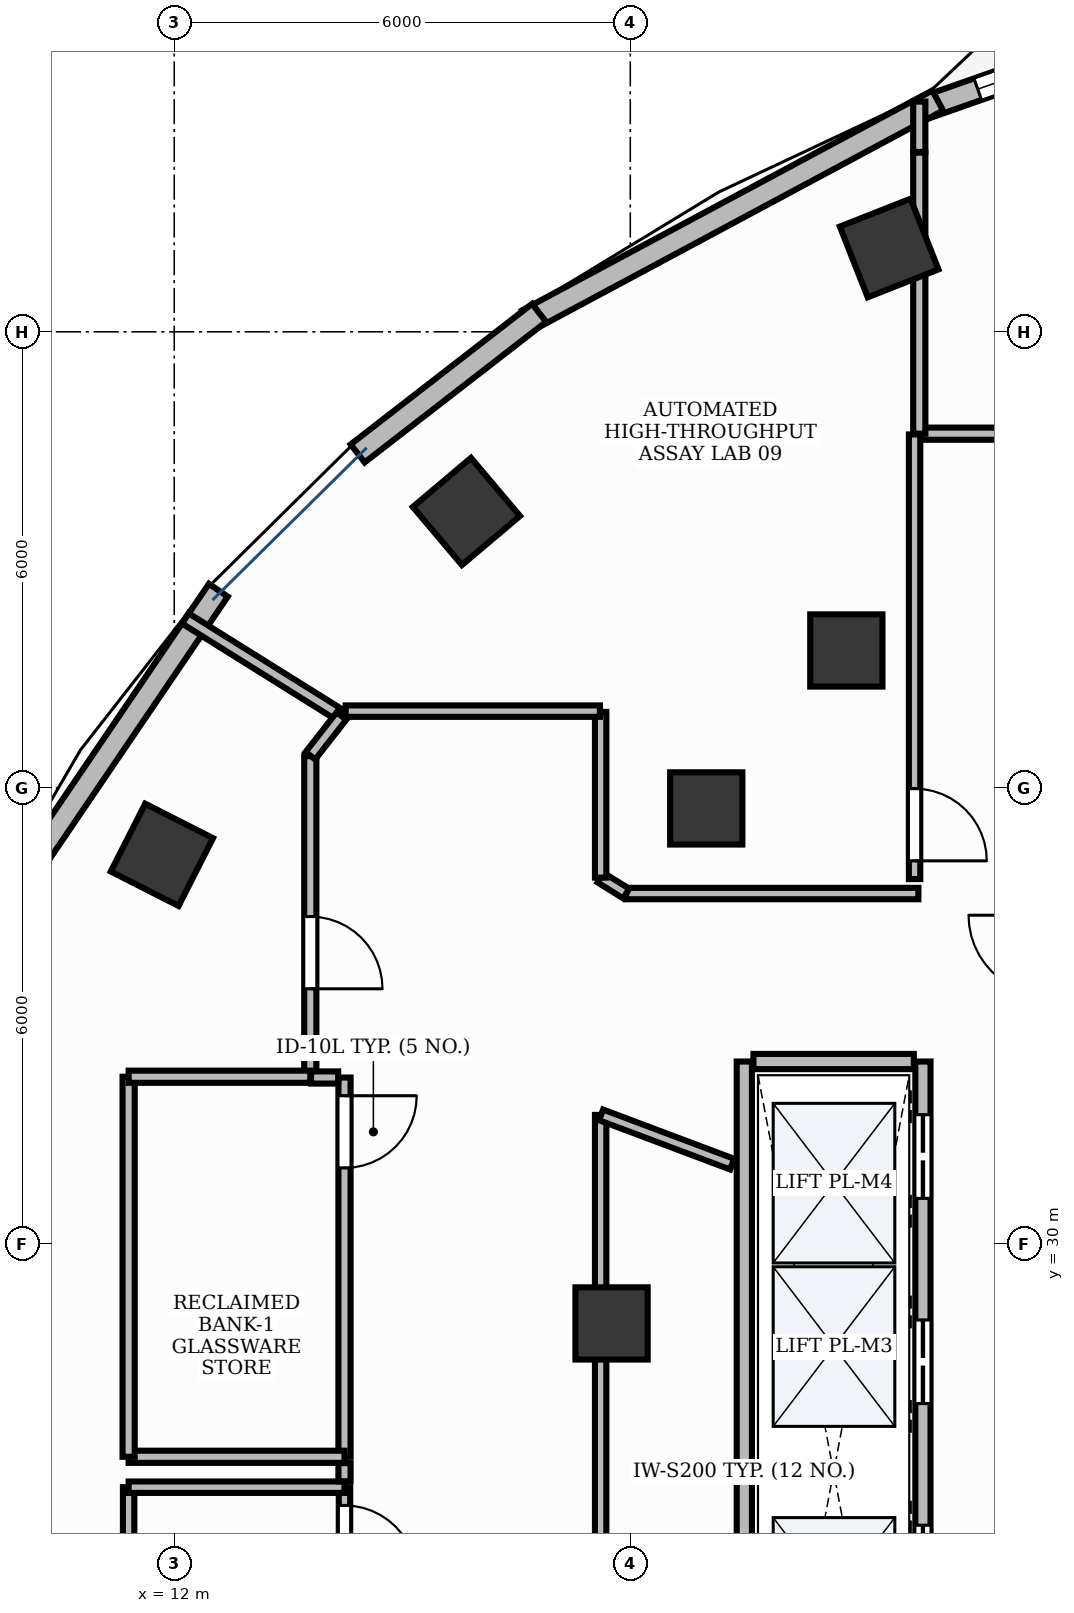
"""IFC4 building model, lengths in metres.
Left out: names, types, materials, properties, quantities, classifications, styles, units other than length and angle.
Written with IfcOpenShell. Run it as: python <this file> out.ifc"""

import sys

from ifc_helpers import new_model, si_unit, direction, frame, frame_2d, origin, origin_2d, place, context, subcontext, project, spatial, rectangle, extrude, element, fill, save


model = new_model("IFC4")
c1 = context("Model", 3, precision=1e-05, world=origin(), true_north=direction((0.0, 1.0)))
c2 = subcontext(c1, "Body", "Model", "MODEL_VIEW")
j1 = project(units=[si_unit("LENGTHUNIT", "METRE"), si_unit("PLANEANGLEUNIT", "RADIAN")], contexts=[c1])
p1 = place(None, origin())
s1 = spatial("IfcSite", under=j1, at=p1, CompositionType="ELEMENT")
p2 = place(p1, origin())
s2 = spatial("IfcBuilding", under=s1, at=p2, CompositionType="ELEMENT")
p3 = place(p2, frame((0.0, 0.0, 187.8)))
s3 = spatial("IfcBuildingStorey", under=s2, at=p3, CompositionType="ELEMENT", Elevation=187.8)
for number, where, z_axis, x_axis in (
    (1, (21.406, 43.103, -0.0), (0.0, 0.0, 1.0), (0.93, 0.367, 0.0)),
    (2, (15.844, 39.637, -0.0), (0.0, 0.0, 1.0), (0.764, 0.645, 0.0)),
):
    element("IfcColumn", number, at=place(p3, frame(where, z_axis=z_axis, x_axis=x_axis)), inside=s3, PredefinedType="COLUMN", context=c2, shape_type="SweptSolid", body=[
        extrude(rectangle(XDim=1.0, YDim=1.0, at=origin_2d()), origin(), (0.0, 0.0, 1.0), 3.901),
    ])
p4 = place(p3, frame((20.842, 37.808, -0.0), z_axis=(0.0, 0.0, 1.0), x_axis=(1.0, 0.0, 0.0)))
e3 = element("IfcColumn", 3, at=p4, inside=s3, PredefinedType="COLUMN", context=c2, shape_type="SweptSolid", body=[
    extrude(rectangle(XDim=0.95, YDim=0.95, at=origin_2d()), origin(), (0.0, 0.0, 1.0), 3.901),
])
p5 = place(p3, frame((11.838, 35.119, -0.0), z_axis=(0.0, 0.0, 1.0), x_axis=(0.453057191132, 0.891481453292, 0.0)))
e4 = element("IfcColumn", 4, at=p5, inside=s3, PredefinedType="COLUMN", context=c2, shape_type="SweptSolid", body=[
    extrude(rectangle(XDim=1.0, YDim=1.0, at=origin_2d()), origin(), (0.0, 0.0, 1.0), 3.901),
])
for number, where, z_axis, x_axis in (
    (5, (19.0, 35.73, -0.0), (0.0, 0.0, 1.0), (1.0, 0.0, 0.0)),
    (6, (17.753, 28.955, -0.0), (0.0, 0.0, 1.0), (1.0, 0.0, 0.0)),
):
    element("IfcColumn", number, at=place(p3, frame(where, z_axis=z_axis, x_axis=x_axis)), inside=s3, PredefinedType="COLUMN", context=c2, shape_type="SweptSolid", body=[
        extrude(rectangle(XDim=0.95, YDim=0.95, at=origin_2d()), origin(), (0.0, 0.0, 1.0), 3.901),
    ])
p6 = place(p3, frame((24.937, 46.023, 0.0), z_axis=(0.0, 0.0, 1.0), x_axis=(-0.943495444321, -0.331385495377, 0.0)))
e7 = element("IfcWall", 7, at=p6, inside=s3, PredefinedType="STANDARD", context=c2, shape_type="SweptSolid", body=[
    extrude(rectangle(XDim=3.214, YDim=0.3, at=frame_2d((1.607, 0.0))), origin(), (0.0, 0.0, 1.0), 3.9),
])
p7 = place(p6, frame((0.707, 0.0, 0.9)))
e8 = element("IfcOpeningElement", 8, at=p7, cuts=e7, PredefinedType="OPENING", context=c2, shape_type="SweptSolid", body=[
    extrude(rectangle(XDim=1.8, YDim=2.1, at=frame_2d((0.9, 1.05))), frame((0.0, 0.165, 0.0), z_axis=(0.0, -1.0, 0.0), x_axis=(1.0, 0.0, 0.0)), (0.0, 0.0, 1.0), 0.33),
])
p8 = place(p3, frame((22.044, 45.043, 0.0), z_axis=(0.0, 0.0, 1.0), x_axis=(-0.881364369565, -0.472437136624, 0.0)))
e9 = element("IfcWall", 9, at=p8, inside=s3, PredefinedType="STANDARD", context=c2, shape_type="SweptSolid", body=[
    extrude(rectangle(XDim=6.124, YDim=0.3, at=frame_2d((3.062, 0.0))), origin(), (0.0, 0.0, 1.0), 3.47),
])
p9 = place(p3, frame((16.8, 42.25, 0.0), z_axis=(0.0, 0.0, 1.0), x_axis=(-0.790530517055, -0.612422649488, 0.0)))
e10 = element("IfcWall", 10, at=p9, inside=s3, PredefinedType="STANDARD", context=c2, shape_type="SweptSolid", body=[
    extrude(rectangle(XDim=3.02, YDim=0.3, at=frame_2d((1.51, 0.0))), origin(), (0.0, 0.0, 1.0), 3.47),
])
p10 = place(p3, frame((12.58, 38.601, 0.0), z_axis=(0.0, 0.0, 1.0), x_axis=(-0.561663900064, -0.827365495634, 0.0)))
e11 = element("IfcWall", 11, at=p10, inside=s3, PredefinedType="STANDARD", context=c2, shape_type="SweptSolid", body=[
    extrude(rectangle(XDim=5.438, YDim=0.3, at=frame_2d((2.719, 0.0))), origin(), (0.0, 0.0, 1.0), 3.9),
])
p11 = place(p3, frame((19.5, 21.6, 0.0), z_axis=(0.0, 0.0, 1.0), x_axis=(0.0, 1.0, 0.0)))
e12 = element("IfcWall", 12, at=p11, inside=s3, PredefinedType="PARTITIONING", context=c2, shape_type="SweptSolid", body=[
    extrude(rectangle(XDim=10.8, YDim=0.2, at=frame_2d((5.4, 0.0))), origin(), (0.0, 0.0, 1.0), 2.91),
])
p12 = place(p3, frame((21.85, 21.6, 0.0), z_axis=(0.0, 0.0, 1.0), x_axis=(0.0, 1.0, 0.0)))
e13 = element("IfcWall", 13, at=p12, inside=s3, PredefinedType="PARTITIONING", context=c2, shape_type="SweptSolid", body=[
    extrude(rectangle(XDim=10.8, YDim=0.2, at=frame_2d((5.4, 0.0))), origin(), (0.0, 0.0, 1.0), 2.91),
])
p13 = place(p12, frame((0.9, 0.0, 0.0)))
e14 = element("IfcOpeningElement", 14, at=p13, cuts=e13, PredefinedType="OPENING", context=c2, shape_type="SweptSolid", body=[
    extrude(rectangle(XDim=1.1, YDim=2.2, at=frame_2d((0.55, 1.1))), frame((0.0, 0.115, 0.0), z_axis=(0.0, -1.0, 0.0), x_axis=(1.0, 0.0, 0.0)), (0.0, 0.0, 1.0), 0.23),
])
p14 = place(p12, frame((3.6, 0.0, 0.0)))
e15 = element("IfcOpeningElement", 15, at=p14, cuts=e13, PredefinedType="OPENING", context=c2, shape_type="SweptSolid", body=[
    extrude(rectangle(XDim=1.1, YDim=2.2, at=frame_2d((0.55, 1.1))), frame((0.0, 0.115, 0.0), z_axis=(0.0, -1.0, 0.0), x_axis=(1.0, 0.0, 0.0)), (0.0, 0.0, 1.0), 0.23),
])
p15 = place(p12, frame((6.3, 0.0, 0.0)))
e16 = element("IfcOpeningElement", 16, at=p15, cuts=e13, PredefinedType="OPENING", context=c2, shape_type="SweptSolid", body=[
    extrude(rectangle(XDim=1.1, YDim=2.2, at=frame_2d((0.55, 1.1))), frame((0.0, 0.115, 0.0), z_axis=(0.0, -1.0, 0.0), x_axis=(1.0, 0.0, 0.0)), (0.0, 0.0, 1.0), 0.23),
])
p16 = place(p12, frame((9.0, 0.0, 0.0)))
e17 = element("IfcOpeningElement", 17, at=p16, cuts=e13, PredefinedType="OPENING", context=c2, shape_type="SweptSolid", body=[
    extrude(rectangle(XDim=1.1, YDim=2.2, at=frame_2d((0.55, 1.1))), frame((0.0, 0.115, 0.0), z_axis=(0.0, -1.0, 0.0), x_axis=(1.0, 0.0, 0.0)), (0.0, 0.0, 1.0), 0.23),
])
p17 = place(p3, frame((19.62, 32.4, 0.0), z_axis=(0.0, 0.0, 1.0), x_axis=(1.0, 0.0, 0.0)))
e18 = element("IfcWall", 18, at=p17, inside=s3, PredefinedType="PARTITIONING", context=c2, shape_type="SweptSolid", body=[
    extrude(rectangle(XDim=2.11, YDim=0.2, at=frame_2d((1.055, 0.0))), origin(), (0.0, 0.0, 1.0), 2.91),
])
p18 = place(p3, frame((14.24, 26.8, 0.0), z_axis=(0.0, 0.0, 1.0), x_axis=(0.0, -1.0, 0.0)))
e19 = element("IfcWall", 19, at=p18, inside=s3, PredefinedType="PARTITIONING", context=c2, shape_type="SweptSolid", body=[
    extrude(rectangle(XDim=4.99, YDim=0.15, at=frame_2d((2.495, 0.0))), origin(), (0.0, 0.0, 1.0), 2.91),
])
p19 = place(p18, frame((0.24, 0.0, 0.0)))
e20 = element("IfcOpeningElement", 20, at=p19, cuts=e19, PredefinedType="OPENING", context=c2, shape_type="SweptSolid", body=[
    extrude(rectangle(XDim=0.95, YDim=2.15, at=frame_2d((0.475, 1.075))), frame((0.0, 0.09, 0.0), z_axis=(0.0, -1.0, 0.0), x_axis=(1.0, 0.0, 0.0)), (0.0, 0.0, 1.0), 0.18),
])
p20 = place(p3, frame((14.24, 32.19, 0.0), z_axis=(0.0, 0.0, 1.0), x_axis=(0.0, -1.0, 0.0)))
e21 = element("IfcWall", 21, at=p20, inside=s3, PredefinedType="PARTITIONING", context=c2, shape_type="SweptSolid", body=[
    extrude(rectangle(XDim=4.99, YDim=0.16, at=frame_2d((2.495, 0.0))), origin(), (0.0, 0.0, 1.0), 2.91),
])
p21 = place(p20, frame((0.24, 0.0, 0.0)))
e22 = element("IfcOpeningElement", 22, at=p21, cuts=e21, PredefinedType="OPENING", context=c2, shape_type="SweptSolid", body=[
    extrude(rectangle(XDim=0.95, YDim=2.15, at=frame_2d((0.475, 1.075))), frame((0.0, 0.095, 0.0), z_axis=(0.0, -1.0, 0.0), x_axis=(1.0, 0.0, 0.0)), (0.0, 0.0, 1.0), 0.19),
])
p22 = place(p3, frame((13.79, 36.417, 0.0), z_axis=(0.0, 0.0, 1.0), x_axis=(0.0, -1.0, 0.0)))
e23 = element("IfcWall", 23, at=p22, inside=s3, PredefinedType="PARTITIONING", context=c2, shape_type="SweptSolid", body=[
    extrude(rectangle(XDim=4.208, YDim=0.16, at=frame_2d((2.104, 0.0))), origin(), (0.0, 0.0, 1.0), 2.91),
])
p23 = place(p22, frame((2.111, 0.0, 0.0)))
e24 = element("IfcOpeningElement", 24, at=p23, cuts=e23, PredefinedType="OPENING", context=c2, shape_type="SweptSolid", body=[
    extrude(rectangle(XDim=0.95, YDim=2.15, at=frame_2d((0.475, 1.075))), frame((0.0, 0.095, 0.0), z_axis=(0.0, -1.0, 0.0), x_axis=(1.0, 0.0, 0.0)), (0.0, 0.0, 1.0), 0.19),
])
p24 = place(p3, frame((17.61, 20.602, 0.0), z_axis=(0.0, 0.0, 1.0), x_axis=(0.0, 1.0, 0.0)))
e25 = element("IfcWall", 25, at=p24, inside=s3, PredefinedType="PARTITIONING", context=c2, shape_type="SweptSolid", body=[
    extrude(rectangle(XDim=11.096, YDim=0.15, at=frame_2d((5.548, 0.0))), origin(), (0.0, 0.0, 1.0), 2.91),
])
p25 = place(p24, frame((3.03, 0.0, 0.0)))
e26 = element("IfcOpeningElement", 26, at=p25, cuts=e25, PredefinedType="OPENING", context=c2, shape_type="SweptSolid", body=[
    extrude(rectangle(XDim=0.95, YDim=2.15, at=frame_2d((0.475, 1.075))), frame((0.0, 0.09, 0.0), z_axis=(0.0, -1.0, 0.0), x_axis=(1.0, 0.0, 0.0)), (0.0, 0.0, 1.0), 0.18),
])
p26 = place(p3, frame((30.232, 40.66, 0.0), z_axis=(0.0, 0.0, 1.0), x_axis=(-1.0, 0.0, 0.0)))
e27 = element("IfcWall", 27, at=p26, inside=s3, PredefinedType="PARTITIONING", context=c2, shape_type="SweptSolid", body=[
    extrude(rectangle(XDim=8.43, YDim=0.16, at=frame_2d((4.215, 0.0))), origin(), (0.0, 0.0, 1.0), 2.91),
])
p27 = place(p26, frame((0.24, 0.0, 0.0)))
e28 = element("IfcOpeningElement", 28, at=p27, cuts=e27, PredefinedType="OPENING", context=c2, shape_type="SweptSolid", body=[
    extrude(rectangle(XDim=0.95, YDim=2.15, at=frame_2d((0.475, 1.075))), frame((0.0, 0.095, 0.0), z_axis=(0.0, -1.0, 0.0), x_axis=(1.0, 0.0, 0.0)), (0.0, 0.0, 1.0), 0.19),
])
p28 = place(p3, frame((21.74, 40.65, 0.0), z_axis=(0.0, 0.0, 1.0), x_axis=(0.0, -1.0, 0.0)))
e29 = element("IfcWall", 29, at=p28, inside=s3, PredefinedType="PARTITIONING", context=c2, shape_type="SweptSolid", body=[
    extrude(rectangle(XDim=5.85, YDim=0.15, at=frame_2d((2.925, 0.0))), origin(), (0.0, 0.0, 1.0), 2.91),
])
p29 = place(p28, frame((4.66, 0.0, 0.0)))
e30 = element("IfcOpeningElement", 30, at=p29, cuts=e29, PredefinedType="OPENING", context=c2, shape_type="SweptSolid", body=[
    extrude(rectangle(XDim=0.95, YDim=2.15, at=frame_2d((0.475, 1.075))), frame((0.0, 0.09, 0.0), z_axis=(0.0, -1.0, 0.0), x_axis=(1.0, 0.0, 0.0)), (0.0, 0.0, 1.0), 0.18),
])
p30 = place(p3, frame((11.4, 21.8, 0.0), z_axis=(0.0, 0.0, 1.0), x_axis=(0.0, 1.0, 0.0)))
e31 = element("IfcWall", 31, at=p30, inside=s3, PredefinedType="PARTITIONING", context=c2, shape_type="SweptSolid", body=[
    extrude(rectangle(XDim=5.0, YDim=0.15, at=frame_2d((2.5, 0.0))), origin(), (0.0, 0.0, 1.0), 2.91),
])
p31 = place(p3, frame((11.4, 26.8, 0.0), z_axis=(0.0, 0.0, 1.0), x_axis=(1.0, 0.0, 0.0)))
e32 = element("IfcWall", 32, at=p31, inside=s3, PredefinedType="PARTITIONING", context=c2, shape_type="SweptSolid", body=[
    extrude(rectangle(XDim=2.84, YDim=0.15, at=frame_2d((1.42, 0.0))), origin(), (0.0, 0.0, 1.0), 2.91),
])
p32 = place(p3, frame((13.8, 32.19, 0.0), z_axis=(0.0, 0.0, 1.0), x_axis=(1.0, 0.0, 0.0)))
e33 = element("IfcWall", 33, at=p32, inside=s3, PredefinedType="PARTITIONING", context=c2, shape_type="SweptSolid", body=[
    extrude(rectangle(XDim=0.357, YDim=0.16, at=frame_2d((0.178, 0.0))), origin(), (0.0, 0.0, 1.0), 2.91),
])
p33 = place(p3, frame((14.24, 27.2, 0.0), z_axis=(0.0, 0.0, 1.0), x_axis=(-1.0, 0.0, 0.0)))
e34 = element("IfcWall", 34, at=p33, inside=s3, PredefinedType="PARTITIONING", context=c2, shape_type="SweptSolid", body=[
    extrude(rectangle(XDim=2.84, YDim=0.16, at=frame_2d((1.42, 0.0))), origin(), (0.0, 0.0, 1.0), 2.91),
])
p34 = place(p3, frame((11.4, 27.2, 0.0), z_axis=(0.0, 0.0, 1.0), x_axis=(0.0, 1.0, 0.0)))
e35 = element("IfcWall", 35, at=p34, inside=s3, PredefinedType="PARTITIONING", context=c2, shape_type="SweptSolid", body=[
    extrude(rectangle(XDim=5.0, YDim=0.16, at=frame_2d((2.5, 0.0))), origin(), (0.0, 0.0, 1.0), 2.91),
])
p35 = place(p3, frame((11.4, 32.2, 0.0), z_axis=(0.0, 0.0, 1.0), x_axis=(1.0, 0.0, 0.0)))
e36 = element("IfcWall", 36, at=p35, inside=s3, PredefinedType="PARTITIONING", context=c2, shape_type="SweptSolid", body=[
    extrude(rectangle(XDim=2.39, YDim=0.16, at=frame_2d((1.195, 0.0))), origin(), (0.0, 0.0, 1.0), 2.91),
])
p36 = place(p3, frame((12.146, 38.229, 0.0), z_axis=(0.0, 0.0, 1.0), x_axis=(0.848066263041, -0.529890190031, 0.0)))
e37 = element("IfcWall", 37, at=p36, inside=s3, PredefinedType="PARTITIONING", context=c2, shape_type="SweptSolid", body=[
    extrude(rectangle(XDim=2.422, YDim=0.16, at=frame_2d((1.211, 0.0))), origin(), (0.0, 0.0, 1.0), 2.91),
])
p37 = place(p3, frame((14.2, 36.946, 0.0), z_axis=(0.0, 0.0, 1.0), x_axis=(-0.615851305214, -0.787862405415, 0.0)))
e38 = element("IfcWall", 38, at=p37, inside=s3, PredefinedType="PARTITIONING", context=c2, shape_type="SweptSolid", body=[
    extrude(rectangle(XDim=0.663, YDim=0.16, at=frame_2d((0.332, 0.0))), origin(), (0.0, 0.0, 1.0), 2.91),
])
p38 = place(p3, frame((14.24, 27.117, 0.0), z_axis=(0.0, 0.0, 1.0), x_axis=(0.0, -1.0, 0.0)))
e39 = element("IfcWall", 39, at=p38, inside=s3, PredefinedType="PARTITIONING", context=c2, shape_type="SweptSolid", body=[
    extrude(rectangle(XDim=0.239, YDim=0.16, at=frame_2d((0.12, 0.0))), origin(), (0.0, 0.0, 1.0), 2.91),
])
p39 = place(p3, frame((17.616, 31.698, 0.0), z_axis=(0.0, 0.0, 1.0), x_axis=(0.936061955156, -0.351835211583, 0.0)))
e40 = element("IfcWall", 40, at=p39, inside=s3, PredefinedType="PARTITIONING", context=c2, shape_type="SweptSolid", body=[
    extrude(rectangle(XDim=1.842, YDim=0.15, at=frame_2d((0.921, 0.0))), origin(), (0.0, 0.0, 1.0), 2.91),
])
p40 = place(p3, frame((21.802, 44.367, 0.0), z_axis=(0.0, 0.0, 1.0), x_axis=(0.0, 1.0, 0.0)))
e41 = element("IfcWall", 41, at=p40, inside=s3, PredefinedType="PARTITIONING", context=c2, shape_type="SweptSolid", body=[
    extrude(rectangle(XDim=0.662, YDim=0.16, at=frame_2d((0.331, 0.0))), origin(), (0.0, 0.0, 1.0), 2.91),
])
p41 = place(p3, frame((21.802, 40.66, 0.0), z_axis=(0.0, 0.0, 1.0), x_axis=(0.0, 1.0, 0.0)))
e42 = element("IfcWall", 42, at=p41, inside=s3, PredefinedType="PARTITIONING", context=c2, shape_type="SweptSolid", body=[
    extrude(rectangle(XDim=3.697, YDim=0.16, at=frame_2d((1.849, 0.0))), origin(), (0.0, 0.0, 1.0), 2.91),
])
p42 = place(p3, frame((21.79, 34.61, 0.0), z_axis=(0.0, 0.0, 1.0), x_axis=(-1.0, 0.0, 0.0)))
e43 = element("IfcWall", 43, at=p42, inside=s3, PredefinedType="PARTITIONING", context=c2, shape_type="SweptSolid", body=[
    extrude(rectangle(XDim=3.844, YDim=0.15, at=frame_2d((1.922, 0.0))), origin(), (0.0, 0.0, 1.0), 2.91),
])
p43 = place(p3, frame((17.946, 34.61, 0.0), z_axis=(0.0, 0.0, 1.0), x_axis=(-0.84820632616, 0.529665959131, 0.0)))
e44 = element("IfcWall", 44, at=p43, inside=s3, PredefinedType="PARTITIONING", context=c2, shape_type="SweptSolid", body=[
    extrude(rectangle(XDim=0.396, YDim=0.15, at=frame_2d((0.198, 0.0))), origin(), (0.0, 0.0, 1.0), 2.91),
])
p44 = place(p3, frame((17.61, 34.82, 0.0), z_axis=(0.0, 0.0, 1.0), x_axis=(0.0, 1.0, 0.0)))
e45 = element("IfcWall", 45, at=p44, inside=s3, PredefinedType="PARTITIONING", context=c2, shape_type="SweptSolid", body=[
    extrude(rectangle(XDim=2.18, YDim=0.15, at=frame_2d((1.09, 0.0))), origin(), (0.0, 0.0, 1.0), 2.91),
])
p45 = place(p3, frame((17.6, 37.01, 0.0), z_axis=(0.0, 0.0, 1.0), x_axis=(-1.0, 0.0, 0.0)))
e46 = element("IfcWall", 46, at=p45, inside=s3, PredefinedType="PARTITIONING", context=c2, shape_type="SweptSolid", body=[
    extrude(rectangle(XDim=3.345, YDim=0.15, at=frame_2d((1.672, 0.0))), origin(), (0.0, 0.0, 1.0), 2.91),
])
p46 = place(p7, origin())
e47 = element("IfcWindow", 47, at=p46, inside=s3, PartitioningType="SINGLE_PANEL", PredefinedType="WINDOW", context=c2, shape_type="SweptSolid", body=[
    extrude(rectangle(XDim=1.8, YDim=2.1, at=frame_2d((0.9, 1.05))), frame((0.0, 0.03, 0.0), z_axis=(0.0, -1.0, 0.0), x_axis=(1.0, 0.0, 0.0)), (0.0, 0.0, 1.0), 0.06),
])
fill(e8, e47)
p47 = place(p14, origin())
e48 = element("IfcDoor", 48, at=p47, inside=s3, OperationType="DOUBLE_DOOR_SLIDING", PredefinedType="DOOR", context=c2, shape_type="SweptSolid", body=[
    extrude(rectangle(XDim=1.1, YDim=2.2, at=frame_2d((0.55, 1.1))), frame((0.0, 0.025, 0.0), z_axis=(0.0, -1.0, 0.0), x_axis=(1.0, 0.0, 0.0)), (0.0, 0.0, 1.0), 0.05),
])
fill(e15, e48)
p48 = place(p15, origin())
e49 = element("IfcDoor", 49, at=p48, inside=s3, OperationType="DOUBLE_DOOR_SLIDING", PredefinedType="DOOR", context=c2, shape_type="SweptSolid", body=[
    extrude(rectangle(XDim=1.1, YDim=2.2, at=frame_2d((0.55, 1.1))), frame((0.0, 0.025, 0.0), z_axis=(0.0, -1.0, 0.0), x_axis=(1.0, 0.0, 0.0)), (0.0, 0.0, 1.0), 0.05),
])
fill(e16, e49)
p49 = place(p16, origin())
e50 = element("IfcDoor", 50, at=p49, inside=s3, OperationType="DOUBLE_DOOR_SLIDING", PredefinedType="DOOR", context=c2, shape_type="SweptSolid", body=[
    extrude(rectangle(XDim=1.1, YDim=2.2, at=frame_2d((0.55, 1.1))), frame((0.0, 0.025, 0.0), z_axis=(0.0, -1.0, 0.0), x_axis=(1.0, 0.0, 0.0)), (0.0, 0.0, 1.0), 0.05),
])
fill(e17, e50)
p50 = place(p19, origin())
e51 = element("IfcDoor", 51, at=p50, inside=s3, OperationType="SINGLE_SWING_RIGHT", PredefinedType="DOOR", context=c2, shape_type="SweptSolid", body=[
    extrude(rectangle(XDim=0.95, YDim=2.15, at=frame_2d((0.475, 1.075))), frame((0.0, 0.025, 0.0), z_axis=(0.0, -1.0, 0.0), x_axis=(1.0, 0.0, 0.0)), (0.0, 0.0, 1.0), 0.05),
])
fill(e20, e51)
p51 = place(p21, origin())
e52 = element("IfcDoor", 52, at=p51, inside=s3, OperationType="SINGLE_SWING_LEFT", PredefinedType="DOOR", context=c2, shape_type="SweptSolid", body=[
    extrude(rectangle(XDim=0.95, YDim=2.15, at=frame_2d((0.475, 1.075))), frame((0.0, 0.025, 0.0), z_axis=(0.0, -1.0, 0.0), x_axis=(1.0, 0.0, 0.0)), (0.0, 0.0, 1.0), 0.05),
])
fill(e22, e52)
p52 = place(p23, origin())
e53 = element("IfcDoor", 53, at=p52, inside=s3, OperationType="SINGLE_SWING_RIGHT", PredefinedType="DOOR", context=c2, shape_type="SweptSolid", body=[
    extrude(rectangle(XDim=0.95, YDim=2.15, at=frame_2d((0.475, 1.075))), frame((0.0, 0.025, 0.0), z_axis=(0.0, -1.0, 0.0), x_axis=(1.0, 0.0, 0.0)), (0.0, 0.0, 1.0), 0.05),
])
fill(e24, e53)
p53 = place(p29, origin())
e54 = element("IfcDoor", 54, at=p53, inside=s3, OperationType="SINGLE_SWING_RIGHT", PredefinedType="DOOR", context=c2, shape_type="SweptSolid", body=[
    extrude(rectangle(XDim=0.95, YDim=2.15, at=frame_2d((0.475, 1.075))), frame((0.0, 0.025, 0.0), z_axis=(0.0, -1.0, 0.0), x_axis=(1.0, 0.0, 0.0)), (0.0, 0.0, 1.0), 0.05),
])
fill(e30, e54)
save(model, sys.argv[1])
